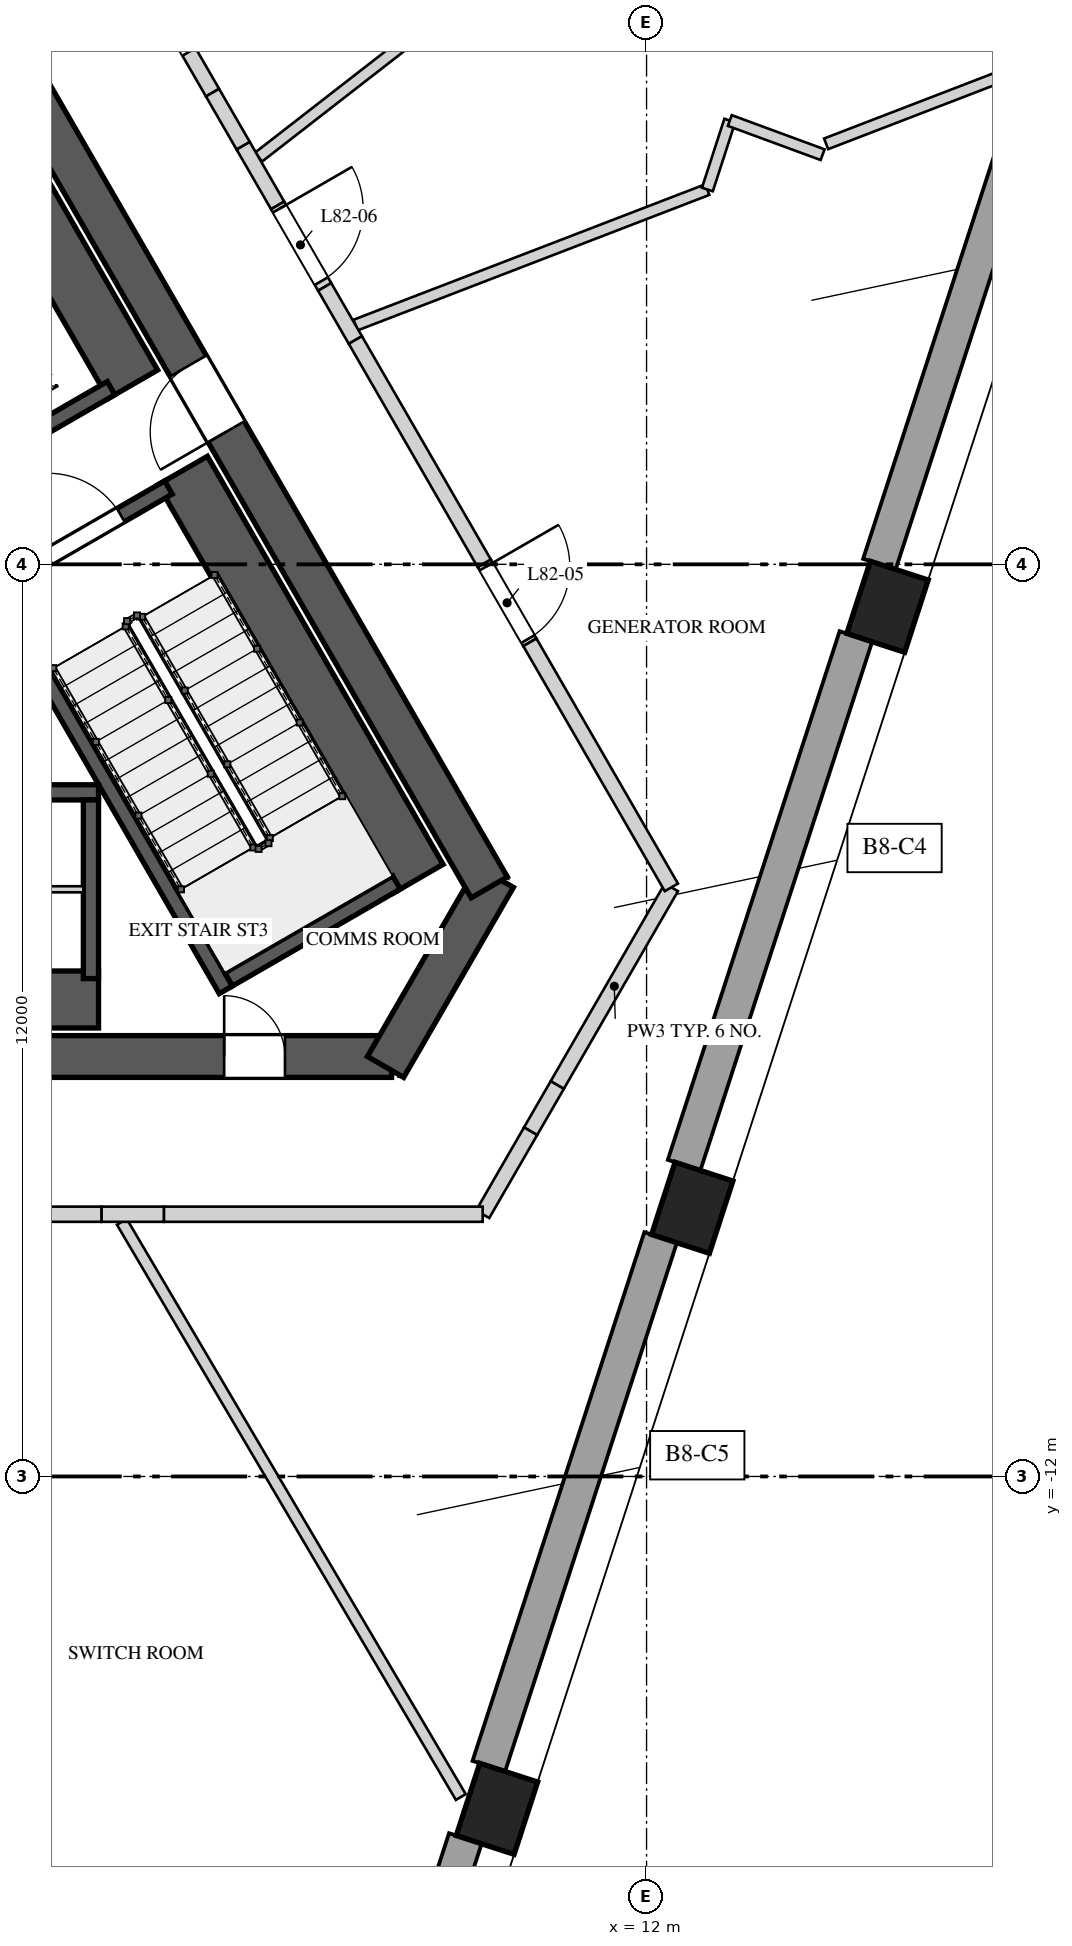
"""IFC4 building model, lengths in metres.
Left out: names, types, materials, properties, quantities, classifications, styles, units other than length and angle.
Written with IfcOpenShell. Run it as: python <this file> out.ifc"""

import sys

from ifc_helpers import new_model, si_unit, direction, frame, frame_2d, origin, origin_2d, place, context, subcontext, project, spatial, polyline, rectangle, outline, extrude, element, fill, save


model = new_model("IFC4")
c1 = context("Model", 3, precision=1e-05, world=origin(), true_north=direction((0.0, 1.0)))
c2 = subcontext(c1, "Body", "Model", "MODEL_VIEW")
j1 = project(units=[si_unit("LENGTHUNIT", "METRE"), si_unit("PLANEANGLEUNIT", "RADIAN")], contexts=[c1])
p1 = place(None, origin())
s1 = spatial("IfcSite", under=j1, at=p1, CompositionType="ELEMENT")
p2 = place(p1, origin())
s2 = spatial("IfcBuilding", under=s1, at=p2, CompositionType="ELEMENT")
p3 = place(p2, frame((0.0, 0.0, 356.9)))
s3 = spatial("IfcBuildingStorey", under=s2, at=p3, CompositionType="ELEMENT", Elevation=356.9)
p4 = place(p3, frame((-8.646, -6.475, 0.0), z_axis=(0.0, 0.0, 1.0), x_axis=(1.0, 0.0, 0.0)))
e1 = element("IfcWall", 1, at=p4, inside=s3, PredefinedType="SHEAR", context=c2, shape_type="SweptSolid", body=[
    extrude(rectangle(XDim=17.292, YDim=0.55, at=frame_2d((8.646, 0.0))), origin(), (0.0, 0.0, 1.0), 4.5),
])
p5 = place(p4, frame((6.851, 0.0, 0.0)))
e2 = element("IfcOpeningElement", 2, at=p5, cuts=e1, PredefinedType="OPENING", context=c2, shape_type="SweptSolid", body=[
    extrude(rectangle(XDim=1.0, YDim=2.4, at=frame_2d((0.5, 1.2))), frame((0.0, 0.285, 0.0), z_axis=(0.0, -1.0, 0.0), x_axis=(1.0, 0.0, 0.0)), (0.0, 0.0, 1.0), 0.57),
])
p6 = place(p4, frame((15.089, 0.0, 0.0)))
e3 = element("IfcOpeningElement", 3, at=p6, cuts=e1, PredefinedType="OPENING", context=c2, shape_type="SweptSolid", body=[
    extrude(rectangle(XDim=0.8, YDim=2.1, at=frame_2d((0.4, 1.05))), frame((0.0, 0.285, 0.0), z_axis=(0.0, -1.0, 0.0), x_axis=(1.0, 0.0, 0.0)), (0.0, 0.0, 1.0), 0.57),
])
p7 = place(p3, frame((8.566, -6.613, 0.0), z_axis=(0.0, 0.0, 1.0), x_axis=(0.499995765644, 0.866027848477, 0.0)))
e4 = element("IfcWall", 4, at=p7, inside=s3, PredefinedType="SHEAR", context=c2, shape_type="SweptSolid", body=[
    extrude(rectangle(XDim=2.887, YDim=0.55, at=frame_2d((1.443, 0.0))), origin(), (0.0, 0.0, 1.0), 4.5),
])
p8 = place(p3, frame((9.93, -4.25, 0.0), z_axis=(0.0, 0.0, 1.0), x_axis=(-0.499994590896, 0.86602852671, 0.0)))
e5 = element("IfcWall", 5, at=p8, inside=s3, PredefinedType="SHEAR", context=c2, shape_type="SweptSolid", body=[
    extrude(rectangle(XDim=17.292, YDim=0.55, at=frame_2d((8.646, 0.0))), origin(), (0.0, 0.0, 1.0), 4.5),
])
p9 = place(p8, frame((6.921, 0.0, 0.0)))
e6 = element("IfcOpeningElement", 6, at=p9, cuts=e5, PredefinedType="OPENING", context=c2, shape_type="SweptSolid", body=[
    extrude(rectangle(XDim=1.0, YDim=2.4, at=frame_2d((0.5, 1.2))), frame((0.0, 0.285, 0.0), z_axis=(0.0, -1.0, 0.0), x_axis=(1.0, 0.0, 0.0)), (0.0, 0.0, 1.0), 0.57),
])
for number, where, z_axis, x_axis in (
    (7, (10.032, -16.372, 0.0), (0.0, 0.0, 1.0), (0.309, 0.951, 0.0)),
    (8, (12.601, -8.465, 0.0), (0.0, 0.0, 1.0), (0.309, 0.951, 0.0)),
    (9, (15.17, -0.558, 0.0), (0.0, 0.0, 1.0), (0.309, 0.951, 0.0)),
):
    element("IfcColumn", number, at=place(p3, frame(where, z_axis=z_axis, x_axis=x_axis)), inside=s3, PredefinedType="COLUMN", context=c2, shape_type="SweptSolid", body=[
        extrude(rectangle(XDim=1.0, YDim=0.8, at=origin_2d()), origin(), (0.0, 0.0, 1.0), 4.5),
    ])
p10 = place(p3, frame((7.541, -23.148, 0.0), z_axis=(0.0, 0.0, 1.0), x_axis=(0.309018647645, 0.951055979114, 0.0)))
e10 = element("IfcWall", 10, at=p10, inside=s3, PredefinedType="SOLIDWALL", context=c2, shape_type="SweptSolid", body=[
    extrude(rectangle(XDim=6.714, YDim=0.45, at=frame_2d((3.357, 0.0))), origin(), (0.0, 0.0, 1.0), 3.8),
])
for number, where, z_axis, x_axis in (
    (11, (9.925, -15.812, 0.0), (0.0, 0.0, 1.0), (0.309, 0.951, 0.0)),
    (12, (12.494, -7.905, 0.0), (0.0, 0.0, 1.0), (0.309, 0.951, 0.0)),
    (13, (15.063, 0.002, 0.0), (0.0, 0.0, 1.0), (0.309, 0.951, 0.0)),
):
    element("IfcWall", number, at=place(p3, frame(where, z_axis=z_axis, x_axis=x_axis)), inside=s3, PredefinedType="SOLIDWALL", context=c2, shape_type="SweptSolid", body=[
        extrude(rectangle(XDim=7.314, YDim=0.45, at=frame_2d((3.657, 0.0))), origin(), (0.0, 0.0, 1.0), 3.8),
    ])
p11 = place(p3, frame((8.998, -4.135, 0.0), z_axis=(0.0, 0.0, 1.0), x_axis=(-0.500009909098, 0.866019682689, 0.0)))
e14 = element("IfcWall", 14, at=p11, inside=s3, PredefinedType="SOLIDWALL", context=c2, shape_type="SweptSolid", body=[
    extrude(rectangle(XDim=6.2, YDim=0.75, at=frame_2d((3.1, 0.0))), origin(), (0.0, 0.0, 1.0), 4.15),
])
p12 = place(p3, frame((6.465, -5.597, 0.0), z_axis=(0.0, 0.0, 1.0), x_axis=(-0.49998037582, 0.866036733513, 0.0)))
e15 = element("IfcWall", 15, at=p12, inside=s3, PredefinedType="SOLIDWALL", context=c2, shape_type="SweptSolid", body=[
    extrude(rectangle(XDim=6.2, YDim=0.2, at=frame_2d((3.1, 0.0))), origin(), (0.0, 0.0, 1.0), 4.15),
])
p13 = place(p3, frame((6.501, -5.461, 0.0), z_axis=(0.0, 0.0, 1.0), x_axis=(0.865989465428, 0.500062241894, 0.0)))
e16 = element("IfcWall", 16, at=p13, inside=s3, PredefinedType="SOLIDWALL", context=c2, shape_type="SweptSolid", body=[
    extrude(rectangle(XDim=2.55, YDim=0.2, at=frame_2d((1.275, 0.0))), origin(), (0.0, 0.0, 1.0), 4.15),
])
p14 = place(p3, frame((3.501, -0.265, 0.0), z_axis=(0.0, 0.0, 1.0), x_axis=(0.866030925526, 0.499990435942, 0.0)))
e17 = element("IfcWall", 17, at=p14, inside=s3, PredefinedType="SOLIDWALL", context=c2, shape_type="SweptSolid", body=[
    extrude(rectangle(XDim=2.55, YDim=0.2, at=frame_2d((1.275, 0.0))), origin(), (0.0, 0.0, 1.0), 4.15),
])
p15 = place(p14, frame((0.725, 0.0, 0.0)))
e18 = element("IfcOpeningElement", 18, at=p15, cuts=e17, PredefinedType="OPENING", context=c2, shape_type="SweptSolid", body=[
    extrude(rectangle(XDim=1.1, YDim=2.4, at=frame_2d((0.55, 1.2))), frame((0.0, 0.11, 0.0), z_axis=(0.0, -1.0, 0.0), x_axis=(1.0, 0.0, 0.0)), (0.0, 0.0, 1.0), 0.22),
])
p16 = place(p3, frame((4.79, -3.0, 0.0), z_axis=(0.0, 0.0, 1.0), x_axis=(-1.0, 0.0, 0.0)))
e19 = element("IfcWall", 19, at=p16, inside=s3, PredefinedType="SOLIDWALL", context=c2, shape_type="SweptSolid", body=[
    extrude(rectangle(XDim=5.5, YDim=0.2, at=frame_2d((2.75, 0.0))), origin(), (0.0, 0.0, 1.0), 4.15),
])
p17 = place(p16, frame((2.275, 0.0, 0.0)))
e20 = element("IfcOpeningElement", 20, at=p17, cuts=e19, PredefinedType="OPENING", context=c2, shape_type="SweptSolid", body=[
    extrude(rectangle(XDim=0.95, YDim=2.4, at=frame_2d((0.475, 1.2))), frame((0.0, 0.11, 0.0), z_axis=(0.0, -1.0, 0.0), x_axis=(1.0, 0.0, 0.0)), (0.0, 0.0, 1.0), 0.22),
])
p18 = place(p3, frame((-0.71, -5.725, 0.0), z_axis=(0.0, 0.0, 1.0), x_axis=(1.0, 0.0, 0.0)))
e21 = element("IfcWall", 21, at=p18, inside=s3, PredefinedType="SOLIDWALL", context=c2, shape_type="SweptSolid", body=[
    extrude(rectangle(XDim=5.5, YDim=0.75, at=frame_2d((2.75, 0.0))), origin(), (0.0, 0.0, 1.0), 4.15),
])
p19 = place(p3, frame((4.69, -3.1, 0.0), z_axis=(0.0, 0.0, 1.0), x_axis=(0.0, -1.0, 0.0)))
e22 = element("IfcWall", 22, at=p19, inside=s3, PredefinedType="SOLIDWALL", context=c2, shape_type="SweptSolid", body=[
    extrude(rectangle(XDim=2.35, YDim=0.2, at=frame_2d((1.175, 0.0))), origin(), (0.0, 0.0, 1.0), 4.15),
])
p20 = place(p3, frame((4.59, -4.275, 0.0), z_axis=(0.0, 0.0, 1.0), x_axis=(-1.0, 0.0, 0.0)))
e23 = element("IfcWall", 23, at=p20, inside=s3, PredefinedType="PARTITIONING", context=c2, shape_type="SweptSolid", body=[
    extrude(rectangle(XDim=5.1, YDim=0.08, at=frame_2d((2.55, 0.0))), origin(), (0.0, 0.0, 1.0), 4.15),
])
p21 = place(p20, frame((1.25, 0.0, 0.0)))
e24 = element("IfcOpeningElement", 24, at=p21, cuts=e23, PredefinedType="OPENING", context=c2, shape_type="SweptSolid", body=[
    extrude(rectangle(XDim=0.8, YDim=2.1, at=frame_2d((0.4, 1.05))), frame((0.0, 0.05, 0.0), z_axis=(0.0, -1.0, 0.0), x_axis=(1.0, 0.0, 0.0)), (0.0, 0.0, 1.0), 0.1),
])
p22 = place(p3, frame((5.243, 2.369, 0.0), z_axis=(0.0, 0.0, 1.0), x_axis=(-0.500002801628, 0.866023786258, 0.0)))
e25 = element("IfcWall", 25, at=p22, inside=s3, PredefinedType="SOLIDWALL", context=c2, shape_type="SweptSolid", body=[
    extrude(rectangle(XDim=4.9, YDim=0.75, at=frame_2d((2.45, 0.0))), origin(), (0.0, 0.0, 1.0), 4.15),
])
p23 = place(p3, frame((2.227, 0.743, 0.0), z_axis=(0.0, 0.0, 1.0), x_axis=(0.866035871367, 0.499981869177, 0.0)))
e26 = element("IfcWall", 26, at=p23, inside=s3, PredefinedType="SOLIDWALL", context=c2, shape_type="SweptSolid", body=[
    extrude(rectangle(XDim=3.15, YDim=0.2, at=frame_2d((1.575, 0.0))), origin(), (0.0, 0.0, 1.0), 4.15),
])
p24 = place(p3, frame((5.097, -8.65, 0.0), z_axis=(0.0, 0.0, 1.0), x_axis=(0.507661360347, -0.861556697618, 0.0)))
e27 = element("IfcWall", 27, at=p24, inside=s3, PredefinedType="PARTITIONING", context=c2, shape_type="SweptSolid", body=[
    extrude(rectangle(XDim=8.783, YDim=0.15, at=frame_2d((4.392, 0.0))), origin(), (0.0, 0.0, 1.0), 3.45),
])
p25 = place(p3, frame((6.895, 5.357, 0.0), z_axis=(0.0, 0.0, 1.0), x_axis=(0.789642975189, 0.613566599266, 0.0)))
e28 = element("IfcWall", 28, at=p25, inside=s3, PredefinedType="PARTITIONING", context=c2, shape_type="SweptSolid", body=[
    extrude(rectangle(XDim=9.447, YDim=0.15, at=frame_2d((4.723, 0.0))), origin(), (0.0, 0.0, 1.0), 3.05),
])
p26 = place(p3, frame((8.171, 3.147, 0.0), z_axis=(0.0, 0.0, 1.0), x_axis=(0.933160243697, 0.359460650953, 0.0)))
e29 = element("IfcWall", 29, at=p26, inside=s3, PredefinedType="PARTITIONING", context=c2, shape_type="SweptSolid", body=[
    extrude(rectangle(XDim=4.959, YDim=0.15, at=frame_2d((2.48, 0.0))), origin(), (0.0, 0.0, 1.0), 3.25),
])
p27 = place(p3, frame((12.8, 4.931, 0.0), z_axis=(0.0, 0.0, 1.0), x_axis=(0.30908028689, 0.951035948982, 0.0)))
e30 = element("IfcWall", 30, at=p27, inside=s3, PredefinedType="PARTITIONING", context=c2, shape_type="SweptSolid", body=[
    extrude(rectangle(XDim=0.954, YDim=0.15, at=frame_2d((0.477, 0.0))), origin(), (0.0, 0.0, 1.0), 3.25),
])
p28 = place(p3, frame((13.095, 5.839, 0.0), z_axis=(0.0, 0.0, 1.0), x_axis=(0.938493614459, -0.345296590803, 0.0)))
e31 = element("IfcWall", 31, at=p28, inside=s3, PredefinedType="PARTITIONING", context=c2, shape_type="SweptSolid", body=[
    extrude(rectangle(XDim=1.301, YDim=0.15, at=frame_2d((0.65, 0.0))), origin(), (0.0, 0.0, 1.0), 3.25),
])
p29 = place(p3, frame((14.363, 5.532, 0.0), z_axis=(0.0, 0.0, 1.0), x_axis=(0.933150029703, 0.359487165369, 0.0)))
e32 = element("IfcWall", 32, at=p29, inside=s3, PredefinedType="PARTITIONING", context=c2, shape_type="SweptSolid", body=[
    extrude(rectangle(XDim=2.769, YDim=0.15, at=frame_2d((1.384, 0.0))), origin(), (0.0, 0.0, 1.0), 4.15),
])
p30 = place(p3, frame((12.326, -4.25, 0.0), z_axis=(0.0, 0.0, 1.0), x_axis=(-0.500003959331, -0.866023117852, 0.0)))
e33 = element("IfcWall", 33, at=p30, inside=s3, PredefinedType="SOLIDWALL", context=c2, shape_type="SweptSolid", body=[
    extrude(rectangle(XDim=3.003, YDim=0.2, at=frame_2d((1.501, 0.0))), origin(), (0.0, 0.0, 1.0), 4.15),
])
p31 = place(p3, frame((10.825, -6.851, 0.0), z_axis=(0.0, 0.0, 1.0), x_axis=(-0.500144223137, -0.865942120504, 0.0)))
e34 = element("IfcWall", 34, at=p31, inside=s3, PredefinedType="SOLIDWALL", context=c2, shape_type="SweptSolid", body=[
    extrude(rectangle(XDim=0.701, YDim=0.2, at=frame_2d((0.351, 0.0))), origin(), (0.0, 0.0, 1.0), 3.45),
])
p32 = place(p3, frame((10.474, -7.458, 0.0), z_axis=(0.0, 0.0, 1.0), x_axis=(-0.499929168788, -0.866066294342, 0.0)))
e35 = element("IfcWall", 35, at=p32, inside=s3, PredefinedType="SOLIDWALL", context=c2, shape_type="SweptSolid", body=[
    extrude(rectangle(XDim=1.261, YDim=0.2, at=frame_2d((0.63, 0.0))), origin(), (0.0, 0.0, 1.0), 4.15),
])
p33 = place(p3, frame((9.844, -8.55, 0.0), z_axis=(0.0, 0.0, 1.0), x_axis=(-1.0, 0.0, 0.0)))
e36 = element("IfcWall", 36, at=p33, inside=s3, PredefinedType="SOLIDWALL", context=c2, shape_type="SweptSolid", body=[
    extrude(rectangle(XDim=4.194, YDim=0.2, at=frame_2d((2.097, 0.0))), origin(), (0.0, 0.0, 1.0), 4.15),
])
p34 = place(p3, frame((5.649, -8.55, 0.0), z_axis=(0.0, 0.0, 1.0), x_axis=(-1.0, 0.0, 0.0)))
e37 = element("IfcWall", 37, at=p34, inside=s3, PredefinedType="SOLIDWALL", context=c2, shape_type="SweptSolid", body=[
    extrude(rectangle(XDim=0.821, YDim=0.2, at=frame_2d((0.411, 0.0))), origin(), (0.0, 0.0, 1.0), 3.45),
])
p35 = place(p3, frame((4.828, -8.55, 0.0), z_axis=(0.0, 0.0, 1.0), x_axis=(-1.0, 0.0, 0.0)))
e38 = element("IfcWall", 38, at=p35, inside=s3, PredefinedType="SOLIDWALL", context=c2, shape_type="SweptSolid", body=[
    extrude(rectangle(XDim=1.038, YDim=0.2, at=frame_2d((0.519, 0.0))), origin(), (0.0, 0.0, 1.0), 4.15),
])
p36 = place(p3, frame((5.406, 7.737, 0.0), z_axis=(0.0, 0.0, 1.0), x_axis=(0.500013151769, -0.866017810474, 0.0)))
e39 = element("IfcWall", 39, at=p36, inside=s3, PredefinedType="SOLIDWALL", context=c2, shape_type="SweptSolid", body=[
    extrude(outline(polyline([(0.0, 0.0), (1.769, 0.0), (1.769, 3.05), (0.825, 3.05), (0.825, 4.15), (0.0, 4.15), (0.0, 0.0)])), frame((0.0, 0.1, 0.0), z_axis=(0.0, -1.0, 0.0), x_axis=(1.0, 0.0, 0.0)), (0.0, 0.0, 1.0), 0.2),
])
p37 = place(p36, frame((0.05, 0.0, 0.0)))
e40 = element("IfcOpeningElement", 40, at=p37, cuts=e39, PredefinedType="OPENING", context=c2, shape_type="SweptSolid", body=[
    extrude(rectangle(XDim=1.1, YDim=2.4, at=frame_2d((0.55, 1.2))), frame((0.0, 0.11, 0.0), z_axis=(0.0, -1.0, 0.0), x_axis=(1.0, 0.0, 0.0)), (0.0, 0.0, 1.0), 0.22),
])
p38 = place(p3, frame((6.29, 6.205, 0.0), z_axis=(0.0, 0.0, 1.0), x_axis=(0.500045602705, -0.86599907345, 0.0)))
e41 = element("IfcWall", 41, at=p38, inside=s3, PredefinedType="SOLIDWALL", context=c2, shape_type="SweptSolid", body=[
    extrude(rectangle(XDim=0.807, YDim=0.2, at=frame_2d((0.403, 0.0))), origin(), (0.0, 0.0, 1.0), 4.15),
])
p39 = place(p3, frame((6.693, 5.507, 0.0), z_axis=(0.0, 0.0, 1.0), x_axis=(0.499994660107, -0.866028486751, 0.0)))
e42 = element("IfcWall", 42, at=p39, inside=s3, PredefinedType="SOLIDWALL", context=c2, shape_type="SweptSolid", body=[
    extrude(rectangle(XDim=0.906, YDim=0.2, at=frame_2d((0.453, 0.0))), origin(), (0.0, 0.0, 1.0), 3.05),
])
p40 = place(p3, frame((7.146, 4.722, 0.0), z_axis=(0.0, 0.0, 1.0), x_axis=(0.499955681623, -0.866050989499, 0.0)))
e43 = element("IfcWall", 43, at=p40, inside=s3, PredefinedType="SOLIDWALL", context=c2, shape_type="SweptSolid", body=[
    extrude(rectangle(XDim=1.238, YDim=0.2, at=frame_2d((0.619, 0.0))), origin(), (0.0, 0.0, 1.0), 4.15),
])
p41 = place(p40, frame((0.05, 0.0, 0.0)))
e44 = element("IfcOpeningElement", 44, at=p41, cuts=e43, PredefinedType="OPENING", context=c2, shape_type="SweptSolid", body=[
    extrude(rectangle(XDim=1.1, YDim=2.4, at=frame_2d((0.55, 1.2))), frame((0.0, 0.11, 0.0), z_axis=(0.0, -1.0, 0.0), x_axis=(1.0, 0.0, 0.0)), (0.0, 0.0, 1.0), 0.22),
])
p42 = place(p3, frame((7.765, 3.65, 0.0), z_axis=(0.0, 0.0, 1.0), x_axis=(0.500141487433, -0.865943700565, 0.0)))
e45 = element("IfcWall", 45, at=p42, inside=s3, PredefinedType="SOLIDWALL", context=c2, shape_type="SweptSolid", body=[
    extrude(rectangle(XDim=0.807, YDim=0.2, at=frame_2d((0.403, 0.0))), origin(), (0.0, 0.0, 1.0), 3.25),
])
p43 = place(p3, frame((8.169, 2.951, 0.0), z_axis=(0.0, 0.0, 1.0), x_axis=(0.499955030392, -0.866051365443, 0.0)))
e46 = element("IfcWall", 46, at=p43, inside=s3, PredefinedType="SOLIDWALL", context=c2, shape_type="SweptSolid", body=[
    extrude(rectangle(XDim=3.392, YDim=0.2, at=frame_2d((1.696, 0.0))), origin(), (0.0, 0.0, 1.0), 4.15),
])
p44 = place(p3, frame((9.865, 0.013, 0.0), z_axis=(0.0, 0.0, 1.0), x_axis=(0.50012165622, -0.865955154139, 0.0)))
e47 = element("IfcWall", 47, at=p44, inside=s3, PredefinedType="SOLIDWALL", context=c2, shape_type="SweptSolid", body=[
    extrude(outline(polyline([(0.0, 0.0), (1.2, 0.0), (1.2, 4.15), (0.857, 4.15), (0.857, 3.45), (0.0, 3.45), (0.0, 0.0)])), frame((0.0, 0.1, 0.0), z_axis=(0.0, -1.0, 0.0), x_axis=(1.0, 0.0, 0.0)), (0.0, 0.0, 1.0), 0.2),
])
p45 = place(p44, frame((0.05, 0.0, 0.0)))
e48 = element("IfcOpeningElement", 48, at=p45, cuts=e47, PredefinedType="OPENING", context=c2, shape_type="SweptSolid", body=[
    extrude(rectangle(XDim=1.1, YDim=2.4, at=frame_2d((0.55, 1.2))), frame((0.0, 0.11, 0.0), z_axis=(0.0, -1.0, 0.0), x_axis=(1.0, 0.0, 0.0)), (0.0, 0.0, 1.0), 0.22),
])
p46 = place(p3, frame((10.465, -1.026, 0.0), z_axis=(0.0, 0.0, 1.0), x_axis=(0.499976014784, -0.866039251212, 0.0)))
e49 = element("IfcWall", 49, at=p46, inside=s3, PredefinedType="SOLIDWALL", context=c2, shape_type="SweptSolid", body=[
    extrude(rectangle(XDim=3.723, YDim=0.2, at=frame_2d((1.861, 0.0))), origin(), (0.0, 0.0, 1.0), 4.15),
])
p47 = place(p15, origin())
e50 = element("IfcDoor", 50, at=p47, inside=s3, OperationType="SINGLE_SWING_RIGHT", PredefinedType="DOOR", context=c2, shape_type="SweptSolid", body=[
    extrude(rectangle(XDim=1.1, YDim=2.4, at=frame_2d((0.55, 1.2))), frame((0.0, 0.025, 0.0), z_axis=(0.0, -1.0, 0.0), x_axis=(1.0, 0.0, 0.0)), (0.0, 0.0, 1.0), 0.05),
])
fill(e18, e50)
p48 = place(p9, origin())
e51 = element("IfcDoor", 51, at=p48, inside=s3, OperationType="SINGLE_SWING_RIGHT", PredefinedType="DOOR", context=c2, shape_type="SweptSolid", body=[
    extrude(rectangle(XDim=1.0, YDim=2.4, at=frame_2d((0.5, 1.2))), frame((0.0, 0.025, 0.0), z_axis=(0.0, -1.0, 0.0), x_axis=(1.0, 0.0, 0.0)), (0.0, 0.0, 1.0), 0.05),
])
fill(e6, e51)
p49 = place(p6, origin())
e52 = element("IfcDoor", 52, at=p49, inside=s3, OperationType="SINGLE_SWING_RIGHT", PredefinedType="DOOR", context=c2, shape_type="SweptSolid", body=[
    extrude(rectangle(XDim=0.8, YDim=2.1, at=frame_2d((0.4, 1.05))), frame((0.0, 0.025, 0.0), z_axis=(0.0, -1.0, 0.0), x_axis=(1.0, 0.0, 0.0)), (0.0, 0.0, 1.0), 0.05),
])
fill(e3, e52)
p50 = place(p45, origin())
e53 = element("IfcDoor", 53, at=p50, inside=s3, OperationType="SINGLE_SWING_LEFT", PredefinedType="DOOR", context=c2, shape_type="SweptSolid", body=[
    extrude(rectangle(XDim=1.1, YDim=2.4, at=frame_2d((0.55, 1.2))), frame((0.0, 0.025, 0.0), z_axis=(0.0, -1.0, 0.0), x_axis=(1.0, 0.0, 0.0)), (0.0, 0.0, 1.0), 0.05),
])
fill(e48, e53)
p51 = place(p41, origin())
e54 = element("IfcDoor", 54, at=p51, inside=s3, OperationType="SINGLE_SWING_RIGHT", PredefinedType="DOOR", context=c2, shape_type="SweptSolid", body=[
    extrude(rectangle(XDim=1.1, YDim=2.4, at=frame_2d((0.55, 1.2))), frame((0.0, 0.025, 0.0), z_axis=(0.0, -1.0, 0.0), x_axis=(1.0, 0.0, 0.0)), (0.0, 0.0, 1.0), 0.05),
])
fill(e44, e54)
p52 = place(p37, origin())
e55 = element("IfcDoor", 55, at=p52, inside=s3, OperationType="SINGLE_SWING_LEFT", PredefinedType="DOOR", context=c2, shape_type="SweptSolid", body=[
    extrude(rectangle(XDim=1.1, YDim=2.4, at=frame_2d((0.55, 1.2))), frame((0.0, 0.025, 0.0), z_axis=(0.0, -1.0, 0.0), x_axis=(1.0, 0.0, 0.0)), (0.0, 0.0, 1.0), 0.05),
])
fill(e40, e55)
save(model, sys.argv[1])
